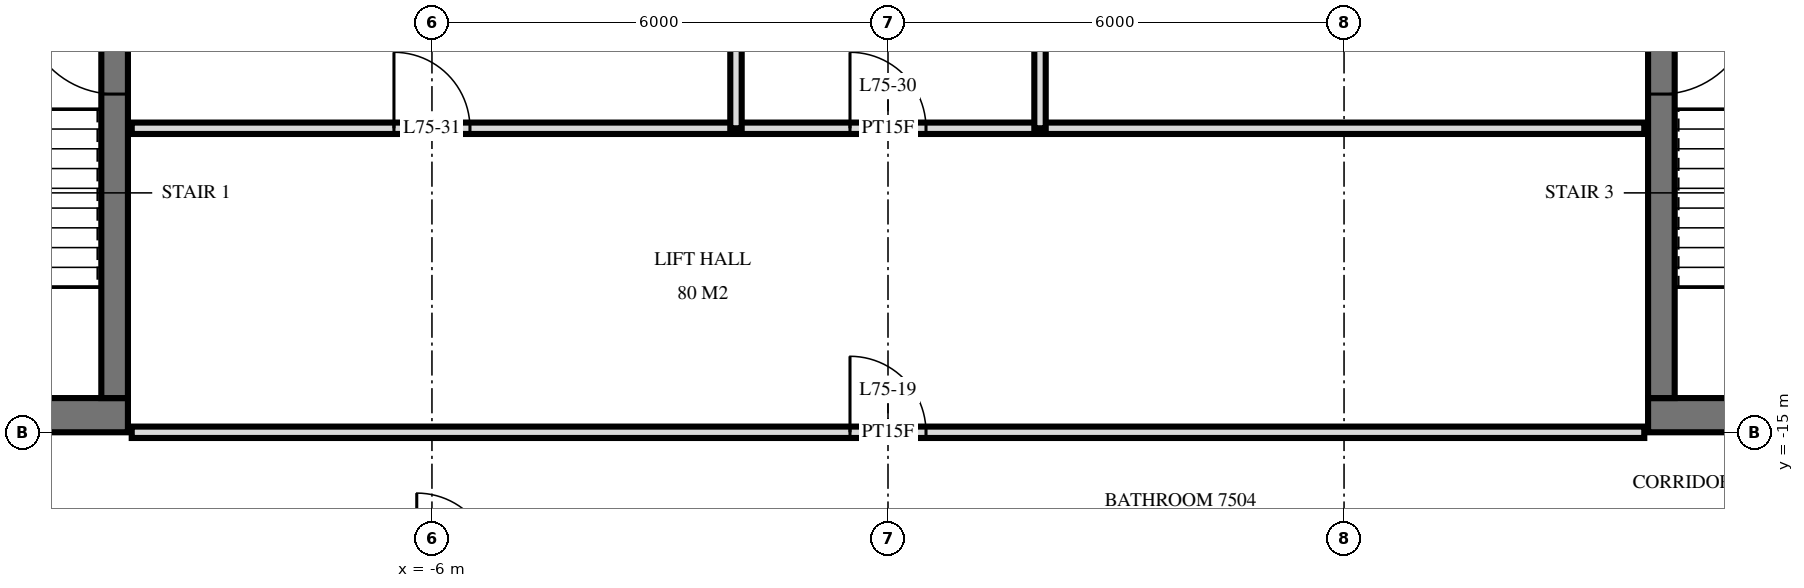
"""IFC4 building model, lengths in metres.
Left out: names, types, materials, properties, quantities, classifications, styles, units other than length and angle.
Written with IfcOpenShell. Run it as: python <this file> out.ifc"""

import sys

from ifc_helpers import new_model, si_unit, direction, frame, frame_2d, origin, place, context, subcontext, project, spatial, rectangle, extrude, element, fill, save


model = new_model("IFC4")
c1 = context("Model", 3, precision=1e-05, world=origin(), true_north=direction((0.0, 1.0)))
c2 = subcontext(c1, "Body", "Model", "MODEL_VIEW")
j1 = project(units=[si_unit("LENGTHUNIT", "METRE"), si_unit("PLANEANGLEUNIT", "RADIAN")], contexts=[c1])
p1 = place(None, origin())
s1 = spatial("IfcSite", under=j1, at=p1, CompositionType="ELEMENT")
p2 = place(p1, origin())
s2 = spatial("IfcBuilding", under=s1, at=p2, CompositionType="ELEMENT")
p3 = place(p2, frame((0.0, 0.0, 284.1)))
s3 = spatial("IfcBuildingStorey", under=s2, at=p3, CompositionType="ELEMENT", Elevation=284.1)
p4 = place(p3, frame((-19.5, -14.775, 0.0), z_axis=(0.0, 0.0, 1.0), x_axis=(1.0, 0.0, 0.0)))
e1 = element("IfcWall", 1, at=p4, inside=s3, PredefinedType="SHEAR", context=c2, shape_type="SweptSolid", body=[
    extrude(rectangle(XDim=9.5, YDim=0.45, at=frame_2d((4.75, 0.0))), origin(), (0.0, 0.0, 1.0), 3.5),
])
p5 = place(p4, frame((1.2, 0.0, 0.0)))
e2 = element("IfcOpeningElement", 2, at=p5, cuts=e1, PredefinedType="OPENING", context=c2, shape_type="SweptSolid", body=[
    extrude(rectangle(XDim=1.2, YDim=2.1, at=frame_2d((0.6, 1.05))), frame((0.0, 0.235, 0.0), z_axis=(0.0, -1.0, 0.0), x_axis=(1.0, 0.0, 0.0)), (0.0, 0.0, 1.0), 0.47),
])
p6 = place(p4, frame((4.25, 0.0, 0.0)))
e3 = element("IfcOpeningElement", 3, at=p6, cuts=e1, PredefinedType="OPENING", context=c2, shape_type="SweptSolid", body=[
    extrude(rectangle(XDim=1.1, YDim=2.1, at=frame_2d((0.55, 1.05))), frame((0.0, 0.235, 0.0), z_axis=(0.0, -1.0, 0.0), x_axis=(1.0, 0.0, 0.0)), (0.0, 0.0, 1.0), 0.47),
])
p7 = place(p3, frame((-10.175, -14.55, 0.0), z_axis=(0.0, 0.0, 1.0), x_axis=(0.0, 1.0, 0.0)))
e4 = element("IfcWall", 4, at=p7, inside=s3, PredefinedType="SHEAR", context=c2, shape_type="SweptSolid", body=[
    extrude(rectangle(XDim=14.1, YDim=0.35, at=frame_2d((7.05, 0.0))), origin(), (0.0, 0.0, 1.0), 3.5),
])
p8 = place(p7, frame((8.4, 0.0, 0.0)))
e5 = element("IfcOpeningElement", 5, at=p8, cuts=e4, PredefinedType="OPENING", context=c2, shape_type="SweptSolid", body=[
    extrude(rectangle(XDim=1.4, YDim=2.4, at=frame_2d((0.7, 1.2))), frame((0.0, 0.185, 0.0), z_axis=(0.0, -1.0, 0.0), x_axis=(1.0, 0.0, 0.0)), (0.0, 0.0, 1.0), 0.37),
])
p9 = place(p7, frame((10.0, 0.0, 0.0)))
e6 = element("IfcOpeningElement", 6, at=p9, cuts=e4, PredefinedType="OPENING", context=c2, shape_type="SweptSolid", body=[
    extrude(rectangle(XDim=1.4, YDim=2.4, at=frame_2d((0.7, 1.2))), frame((0.0, 0.185, 0.0), z_axis=(0.0, -1.0, 0.0), x_axis=(1.0, 0.0, 0.0)), (0.0, 0.0, 1.0), 0.37),
])
p10 = place(p7, frame((4.0, 0.0, 0.0)))
e7 = element("IfcOpeningElement", 7, at=p10, cuts=e4, PredefinedType="OPENING", context=c2, shape_type="SweptSolid", body=[
    extrude(rectangle(XDim=1.2, YDim=2.1, at=frame_2d((0.6, 1.05))), frame((0.0, 0.185, 0.0), z_axis=(0.0, -1.0, 0.0), x_axis=(1.0, 0.0, 0.0)), (0.0, 0.0, 1.0), 0.37),
])
p11 = place(p3, frame((10.0, -14.775, 0.0), z_axis=(0.0, 0.0, 1.0), x_axis=(1.0, 0.0, 0.0)))
e8 = element("IfcWall", 8, at=p11, inside=s3, PredefinedType="SHEAR", context=c2, shape_type="SweptSolid", body=[
    extrude(rectangle(XDim=9.5, YDim=0.45, at=frame_2d((4.75, 0.0))), origin(), (0.0, 0.0, 1.0), 3.5),
])
p12 = place(p11, frame((7.1, 0.0, 0.0)))
e9 = element("IfcOpeningElement", 9, at=p12, cuts=e8, PredefinedType="OPENING", context=c2, shape_type="SweptSolid", body=[
    extrude(rectangle(XDim=1.2, YDim=2.1, at=frame_2d((0.6, 1.05))), frame((0.0, 0.235, 0.0), z_axis=(0.0, -1.0, 0.0), x_axis=(1.0, 0.0, 0.0)), (0.0, 0.0, 1.0), 0.47),
])
p13 = place(p11, frame((4.15, 0.0, 0.0)))
e10 = element("IfcOpeningElement", 10, at=p13, cuts=e8, PredefinedType="OPENING", context=c2, shape_type="SweptSolid", body=[
    extrude(rectangle(XDim=1.1, YDim=2.1, at=frame_2d((0.55, 1.05))), frame((0.0, 0.235, 0.0), z_axis=(0.0, -1.0, 0.0), x_axis=(1.0, 0.0, 0.0)), (0.0, 0.0, 1.0), 0.47),
])
p14 = place(p3, frame((10.175, -14.55, 0.0), z_axis=(0.0, 0.0, 1.0), x_axis=(0.0, 1.0, 0.0)))
e11 = element("IfcWall", 11, at=p14, inside=s3, PredefinedType="SHEAR", context=c2, shape_type="SweptSolid", body=[
    extrude(rectangle(XDim=14.1, YDim=0.35, at=frame_2d((7.05, 0.0))), origin(), (0.0, 0.0, 1.0), 3.5),
])
p15 = place(p14, frame((8.4, 0.0, 0.0)))
e12 = element("IfcOpeningElement", 12, at=p15, cuts=e11, PredefinedType="OPENING", context=c2, shape_type="SweptSolid", body=[
    extrude(rectangle(XDim=1.4, YDim=2.4, at=frame_2d((0.7, 1.2))), frame((0.0, 0.185, 0.0), z_axis=(0.0, -1.0, 0.0), x_axis=(1.0, 0.0, 0.0)), (0.0, 0.0, 1.0), 0.37),
])
p16 = place(p14, frame((10.0, 0.0, 0.0)))
e13 = element("IfcOpeningElement", 13, at=p16, cuts=e11, PredefinedType="OPENING", context=c2, shape_type="SweptSolid", body=[
    extrude(rectangle(XDim=1.4, YDim=2.4, at=frame_2d((0.7, 1.2))), frame((0.0, 0.185, 0.0), z_axis=(0.0, -1.0, 0.0), x_axis=(1.0, 0.0, 0.0)), (0.0, 0.0, 1.0), 0.37),
])
p17 = place(p14, frame((4.0, 0.0, 0.0)))
e14 = element("IfcOpeningElement", 14, at=p17, cuts=e11, PredefinedType="OPENING", context=c2, shape_type="SweptSolid", body=[
    extrude(rectangle(XDim=1.2, YDim=2.1, at=frame_2d((0.6, 1.05))), frame((0.0, 0.185, 0.0), z_axis=(0.0, -1.0, 0.0), x_axis=(1.0, 0.0, 0.0)), (0.0, 0.0, 1.0), 0.37),
])
for number, where, z_axis, x_axis in (
    (15, (2.0, -11.0, 0.0), (0.0, 0.0, 1.0), (0.0, 1.0, 0.0)),
    (16, (-2.0, -11.0, 0.0), (0.0, 0.0, 1.0), (0.0, 1.0, 0.0)),
):
    element("IfcWall", number, at=place(p3, frame(where, z_axis=z_axis, x_axis=x_axis)), inside=s3, PredefinedType="PARTITIONING", context=c2, shape_type="SweptSolid", body=[
        extrude(rectangle(XDim=4.0, YDim=0.15, at=frame_2d((2.0, 0.0))), origin(), (0.0, 0.0, 1.0), 3.22),
    ])
p18 = place(p3, frame((-9.95, -15.0, 0.0), z_axis=(0.0, 0.0, 1.0), x_axis=(1.0, 0.0, 0.0)))
e17 = element("IfcWall", 17, at=p18, inside=s3, PredefinedType="PARTITIONING", context=c2, shape_type="SweptSolid", body=[
    extrude(rectangle(XDim=19.9, YDim=0.15, at=frame_2d((9.95, 0.0))), origin(), (0.0, 0.0, 1.0), 2.584),
])
p19 = place(p18, frame((9.45, 0.0, 0.0)))
e18 = element("IfcOpeningElement", 18, at=p19, cuts=e17, PredefinedType="OPENING", context=c2, shape_type="SweptSolid", body=[
    extrude(rectangle(XDim=1.0, YDim=2.1, at=frame_2d((0.5, 1.05))), frame((0.0, 0.085, 0.0), z_axis=(0.0, -1.0, 0.0), x_axis=(1.0, 0.0, 0.0)), (0.0, 0.0, 1.0), 0.17),
])
p20 = place(p3, frame((-9.95, -11.0, 0.0), z_axis=(0.0, 0.0, 1.0), x_axis=(1.0, 0.0, 0.0)))
e19 = element("IfcWall", 19, at=p20, inside=s3, PredefinedType="PARTITIONING", context=c2, shape_type="SweptSolid", body=[
    extrude(rectangle(XDim=19.9, YDim=0.15, at=frame_2d((9.95, 0.0))), origin(), (0.0, 0.0, 1.0), 3.22),
])
p21 = place(p20, frame((9.45, 0.0, 0.0)))
e20 = element("IfcOpeningElement", 20, at=p21, cuts=e19, PredefinedType="OPENING", context=c2, shape_type="SweptSolid", body=[
    extrude(rectangle(XDim=1.0, YDim=2.1, at=frame_2d((0.5, 1.05))), frame((0.0, 0.085, 0.0), z_axis=(0.0, -1.0, 0.0), x_axis=(1.0, 0.0, 0.0)), (0.0, 0.0, 1.0), 0.17),
])
p22 = place(p20, frame((3.45, 0.0, 0.0)))
e21 = element("IfcOpeningElement", 21, at=p22, cuts=e19, PredefinedType="OPENING", context=c2, shape_type="SweptSolid", body=[
    extrude(rectangle(XDim=1.0, YDim=2.1, at=frame_2d((0.5, 1.05))), frame((0.0, 0.085, 0.0), z_axis=(0.0, -1.0, 0.0), x_axis=(1.0, 0.0, 0.0)), (0.0, 0.0, 1.0), 0.17),
])
p23 = place(p10, origin())
e22 = element("IfcDoor", 22, at=p23, inside=s3, OperationType="SINGLE_SWING_LEFT", PredefinedType="DOOR", context=c2, shape_type="SweptSolid", body=[
    extrude(rectangle(XDim=1.2, YDim=2.1, at=frame_2d((0.6, 1.05))), frame((0.0, 0.025, 0.0), z_axis=(0.0, -1.0, 0.0), x_axis=(1.0, 0.0, 0.0)), (0.0, 0.0, 1.0), 0.05),
])
fill(e7, e22)
p24 = place(p17, frame((0.6, 0.0, 0.0), z_axis=(0.0, 0.0, 1.0), x_axis=(-1.0, 0.0, 0.0)))
e23 = element("IfcDoor", 23, at=p24, inside=s3, OperationType="SINGLE_SWING_RIGHT", PredefinedType="DOOR", context=c2, shape_type="SweptSolid", body=[
    extrude(rectangle(XDim=1.2, YDim=2.1, at=frame_2d((0.0, 1.05))), frame((0.0, -0.025, 0.0), z_axis=(0.0, 1.0, 0.0), x_axis=(-1.0, 0.0, 0.0)), (0.0, 0.0, 1.0), 0.05),
])
fill(e14, e23)
p25 = place(p19, origin())
e24 = element("IfcDoor", 24, at=p25, inside=s3, OperationType="SINGLE_SWING_RIGHT", PredefinedType="DOOR", context=c2, shape_type="SweptSolid", body=[
    extrude(rectangle(XDim=1.0, YDim=2.1, at=frame_2d((0.5, 1.05))), frame((0.0, 0.025, 0.0), z_axis=(0.0, -1.0, 0.0), x_axis=(1.0, 0.0, 0.0)), (0.0, 0.0, 1.0), 0.05),
])
fill(e18, e24)
p26 = place(p21, origin())
e25 = element("IfcDoor", 25, at=p26, inside=s3, OperationType="SINGLE_SWING_RIGHT", PredefinedType="DOOR", context=c2, shape_type="SweptSolid", body=[
    extrude(rectangle(XDim=1.0, YDim=2.1, at=frame_2d((0.5, 1.05))), frame((0.0, 0.025, 0.0), z_axis=(0.0, -1.0, 0.0), x_axis=(1.0, 0.0, 0.0)), (0.0, 0.0, 1.0), 0.05),
])
fill(e20, e25)
p27 = place(p22, origin())
e26 = element("IfcDoor", 26, at=p27, inside=s3, OperationType="SINGLE_SWING_RIGHT", PredefinedType="DOOR", context=c2, shape_type="SweptSolid", body=[
    extrude(rectangle(XDim=1.0, YDim=2.1, at=frame_2d((0.5, 1.05))), frame((0.0, 0.025, 0.0), z_axis=(0.0, -1.0, 0.0), x_axis=(1.0, 0.0, 0.0)), (0.0, 0.0, 1.0), 0.05),
])
fill(e21, e26)
save(model, sys.argv[1])
